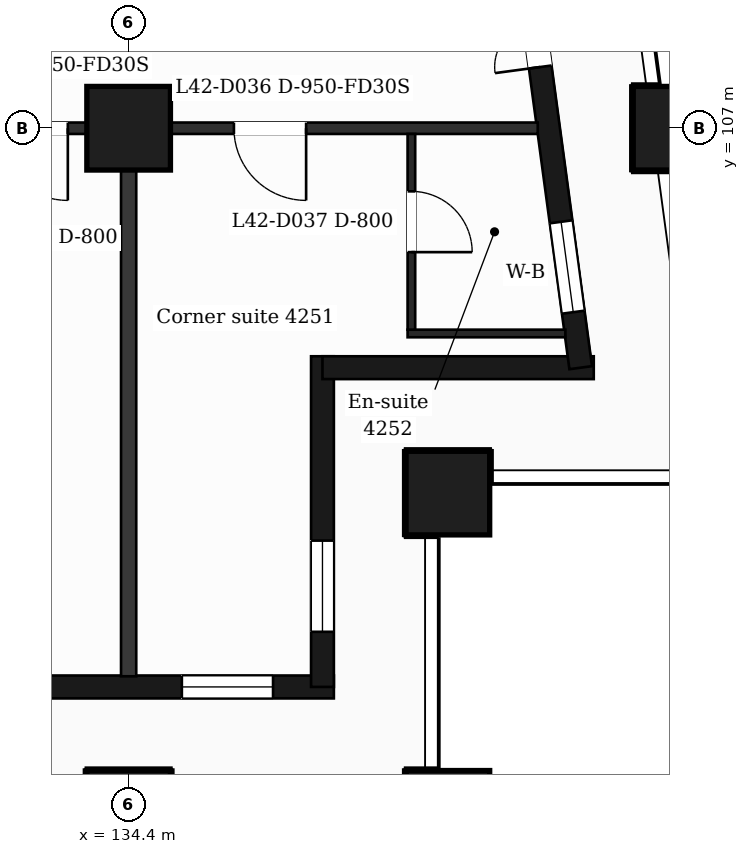
"""IFC4 building model, lengths in metres.
Left out: names, types, materials, properties, quantities, classifications, styles, units other than length and angle.
Written with IfcOpenShell. Run it as: python <this file> out.ifc"""

import sys

from ifc_helpers import new_model, si_unit, direction, frame, frame_2d, origin, origin_2d, place, context, subcontext, project, spatial, rectangle, extrude, element, fill, save


model = new_model("IFC4")
c1 = context("Model", 3, precision=1e-05, world=origin(), true_north=direction((0.0, 1.0)))
c2 = subcontext(c1, "Body", "Model", "MODEL_VIEW")
j1 = project(units=[si_unit("LENGTHUNIT", "METRE"), si_unit("PLANEANGLEUNIT", "RADIAN")], contexts=[c1])
p1 = place(None, origin())
s1 = spatial("IfcSite", under=j1, at=p1, CompositionType="ELEMENT")
p2 = place(p1, origin())
s2 = spatial("IfcBuilding", under=s1, at=p2, CompositionType="ELEMENT")
p3 = place(p2, frame((0.0, 0.0, 177.4)))
s3 = spatial("IfcBuildingStorey", under=s2, at=p3, CompositionType="ELEMENT", Elevation=177.4)
for number, where, z_axis, x_axis in (
    (1, (134.4, 98.0, 0.0), (0.0, 0.0, 1.0), (1.0, 0.0, 0.0)),
    (2, (138.6, 98.0, 0.0), (0.0, 0.0, 1.0), (1.0, 0.0, 0.0)),
    (3, (138.6, 102.2, 0.0), (0.0, 0.0, 1.0), (1.0, 0.0, 0.0)),
    (4, (134.4, 107.0, 0.0), (0.0, 0.0, 1.0), (1.0, 0.0, 0.0)),
    (5, (141.588, 107.0, 0.0), (0.0, 0.0, 1.0), (1.0, 0.0, 0.0)),
):
    element("IfcColumn", number, at=place(p3, frame(where, z_axis=z_axis, x_axis=x_axis)), inside=s3, PredefinedType="COLUMN", context=c2, shape_type="SweptSolid", body=[
        extrude(rectangle(XDim=1.1, YDim=1.1, at=origin_2d()), origin(), (0.0, 0.0, 1.0), 3.7),
    ])
p4 = place(p3, frame((89.85, 99.65, 0.0), z_axis=(0.0, 0.0, 1.0), x_axis=(1.0, 0.0, 0.0)))
e6 = element("IfcWall", 6, at=p4, inside=s3, PredefinedType="SOLIDWALL", context=c2, shape_type="SweptSolid", body=[
    extrude(rectangle(XDim=47.25, YDim=0.3, at=frame_2d((23.625, 0.0))), origin(), (0.0, 0.0, 1.0), 3.38),
])
p5 = place(p4, frame((0.725, 0.0, 0.9)))
e7 = element("IfcOpeningElement", 7, at=p5, cuts=e6, PredefinedType="OPENING", context=c2, shape_type="SweptSolid", body=[
    extrude(rectangle(XDim=1.2, YDim=2.1, at=frame_2d((0.6, 1.05))), frame((0.0, 0.16, 0.0), z_axis=(0.0, -1.0, 0.0), x_axis=(1.0, 0.0, 0.0)), (0.0, 0.0, 1.0), 0.32),
])
p6 = place(p4, frame((3.45, 0.0, 0.9)))
e8 = element("IfcOpeningElement", 8, at=p6, cuts=e6, PredefinedType="OPENING", context=c2, shape_type="SweptSolid", body=[
    extrude(rectangle(XDim=2.4, YDim=2.1, at=frame_2d((1.2, 1.05))), frame((0.0, 0.16, 0.0), z_axis=(0.0, -1.0, 0.0), x_axis=(1.0, 0.0, 0.0)), (0.0, 0.0, 1.0), 0.32),
])
p7 = place(p4, frame((8.25, 0.0, 0.9)))
e9 = element("IfcOpeningElement", 9, at=p7, cuts=e6, PredefinedType="OPENING", context=c2, shape_type="SweptSolid", body=[
    extrude(rectangle(XDim=1.2, YDim=2.1, at=frame_2d((0.6, 1.05))), frame((0.0, 0.16, 0.0), z_axis=(0.0, -1.0, 0.0), x_axis=(1.0, 0.0, 0.0)), (0.0, 0.0, 1.0), 0.32),
])
p8 = place(p4, frame((12.45, 0.0, 0.9)))
e10 = element("IfcOpeningElement", 10, at=p8, cuts=e6, PredefinedType="OPENING", context=c2, shape_type="SweptSolid", body=[
    extrude(rectangle(XDim=1.2, YDim=2.1, at=frame_2d((0.6, 1.05))), frame((0.0, 0.16, 0.0), z_axis=(0.0, -1.0, 0.0), x_axis=(1.0, 0.0, 0.0)), (0.0, 0.0, 1.0), 0.32),
])
p9 = place(p4, frame((16.05, 0.0, 0.9)))
e11 = element("IfcOpeningElement", 11, at=p9, cuts=e6, PredefinedType="OPENING", context=c2, shape_type="SweptSolid", body=[
    extrude(rectangle(XDim=2.4, YDim=2.1, at=frame_2d((1.2, 1.05))), frame((0.0, 0.16, 0.0), z_axis=(0.0, -1.0, 0.0), x_axis=(1.0, 0.0, 0.0)), (0.0, 0.0, 1.0), 0.32),
])
p10 = place(p4, frame((20.25, 0.0, 0.9)))
e12 = element("IfcOpeningElement", 12, at=p10, cuts=e6, PredefinedType="OPENING", context=c2, shape_type="SweptSolid", body=[
    extrude(rectangle(XDim=2.4, YDim=2.1, at=frame_2d((1.2, 1.05))), frame((0.0, 0.16, 0.0), z_axis=(0.0, -1.0, 0.0), x_axis=(1.0, 0.0, 0.0)), (0.0, 0.0, 1.0), 0.32),
])
p11 = place(p4, frame((25.05, 0.0, 0.0)))
e13 = element("IfcOpeningElement", 13, at=p11, cuts=e6, PredefinedType="OPENING", context=c2, shape_type="SweptSolid", body=[
    extrude(rectangle(XDim=1.2, YDim=2.4, at=frame_2d((0.6, 1.2))), frame((0.0, 0.16, 0.0), z_axis=(0.0, -1.0, 0.0), x_axis=(1.0, 0.0, 0.0)), (0.0, 0.0, 1.0), 0.32),
])
p12 = place(p4, frame((28.65, 0.0, 0.9)))
e14 = element("IfcOpeningElement", 14, at=p12, cuts=e6, PredefinedType="OPENING", context=c2, shape_type="SweptSolid", body=[
    extrude(rectangle(XDim=2.4, YDim=2.1, at=frame_2d((1.2, 1.05))), frame((0.0, 0.16, 0.0), z_axis=(0.0, -1.0, 0.0), x_axis=(1.0, 0.0, 0.0)), (0.0, 0.0, 1.0), 0.32),
])
p13 = place(p4, frame((32.85, 0.0, 0.9)))
e15 = element("IfcOpeningElement", 15, at=p13, cuts=e6, PredefinedType="OPENING", context=c2, shape_type="SweptSolid", body=[
    extrude(rectangle(XDim=2.4, YDim=2.1, at=frame_2d((1.2, 1.05))), frame((0.0, 0.16, 0.0), z_axis=(0.0, -1.0, 0.0), x_axis=(1.0, 0.0, 0.0)), (0.0, 0.0, 1.0), 0.32),
])
p14 = place(p4, frame((37.65, 0.0, 0.9)))
e16 = element("IfcOpeningElement", 16, at=p14, cuts=e6, PredefinedType="OPENING", context=c2, shape_type="SweptSolid", body=[
    extrude(rectangle(XDim=1.2, YDim=2.1, at=frame_2d((0.6, 1.05))), frame((0.0, 0.16, 0.0), z_axis=(0.0, -1.0, 0.0), x_axis=(1.0, 0.0, 0.0)), (0.0, 0.0, 1.0), 0.32),
])
p15 = place(p4, frame((41.85, 0.0, 0.9)))
e17 = element("IfcOpeningElement", 17, at=p15, cuts=e6, PredefinedType="OPENING", context=c2, shape_type="SweptSolid", body=[
    extrude(rectangle(XDim=1.2, YDim=2.1, at=frame_2d((0.6, 1.05))), frame((0.0, 0.16, 0.0), z_axis=(0.0, -1.0, 0.0), x_axis=(1.0, 0.0, 0.0)), (0.0, 0.0, 1.0), 0.32),
])
p16 = place(p4, frame((45.25, 0.0, 0.9)))
e18 = element("IfcOpeningElement", 18, at=p16, cuts=e6, PredefinedType="OPENING", context=c2, shape_type="SweptSolid", body=[
    extrude(rectangle(XDim=1.2, YDim=2.1, at=frame_2d((0.6, 1.05))), frame((0.0, 0.16, 0.0), z_axis=(0.0, -1.0, 0.0), x_axis=(1.0, 0.0, 0.0)), (0.0, 0.0, 1.0), 0.32),
])
p17 = place(p3, frame((136.95, 99.65, 0.0), z_axis=(0.0, 0.0, 1.0), x_axis=(0.0, 1.0, 0.0)))
e19 = element("IfcWall", 19, at=p17, inside=s3, PredefinedType="SOLIDWALL", context=c2, shape_type="SweptSolid", body=[
    extrude(rectangle(XDim=4.35, YDim=0.3, at=frame_2d((2.175, 0.0))), origin(), (0.0, 0.0, 1.0), 3.38),
])
p18 = place(p17, frame((0.725, 0.0, 0.9)))
e20 = element("IfcOpeningElement", 20, at=p18, cuts=e19, PredefinedType="OPENING", context=c2, shape_type="SweptSolid", body=[
    extrude(rectangle(XDim=1.2, YDim=2.1, at=frame_2d((0.6, 1.05))), frame((0.0, 0.16, 0.0), z_axis=(0.0, -1.0, 0.0), x_axis=(1.0, 0.0, 0.0)), (0.0, 0.0, 1.0), 0.32),
])
p19 = place(p3, frame((136.95, 103.85, 0.0), z_axis=(0.0, 0.0, 1.0), x_axis=(1.0, 0.0, 0.0)))
e21 = element("IfcWall", 21, at=p19, inside=s3, PredefinedType="SOLIDWALL", context=c2, shape_type="SweptSolid", body=[
    extrude(rectangle(XDim=3.569, YDim=0.3, at=frame_2d((1.785, 0.0))), origin(), (0.0, 0.0, 1.0), 3.38),
])
p20 = place(p3, frame((140.348, 103.85, 0.0), z_axis=(0.0, 0.0, 1.0), x_axis=(-0.133431549479, 0.991058031401, 0.0)))
e22 = element("IfcWall", 22, at=p20, inside=s3, PredefinedType="SOLIDWALL", context=c2, shape_type="SweptSolid", body=[
    extrude(rectangle(XDim=6.609, YDim=0.3, at=frame_2d((3.304, 0.0))), origin(), (0.0, 0.0, 1.0), 3.38),
])
p21 = place(p20, frame((0.737, 0.0, 0.9)))
e23 = element("IfcOpeningElement", 23, at=p21, cuts=e22, PredefinedType="OPENING", context=c2, shape_type="SweptSolid", body=[
    extrude(rectangle(XDim=1.2, YDim=2.1, at=frame_2d((0.6, 1.05))), frame((0.0, 0.16, 0.0), z_axis=(0.0, -1.0, 0.0), x_axis=(1.0, 0.0, 0.0)), (0.0, 0.0, 1.0), 0.32),
])
p22 = place(p20, frame((3.991, 0.0, 0.0)))
e24 = element("IfcOpeningElement", 24, at=p22, cuts=e22, PredefinedType="OPENING", context=c2, shape_type="SweptSolid", body=[
    extrude(rectangle(XDim=1.2, YDim=2.4, at=frame_2d((0.6, 1.2))), frame((0.0, 0.16, 0.0), z_axis=(0.0, -1.0, 0.0), x_axis=(1.0, 0.0, 0.0)), (0.0, 0.0, 1.0), 0.32),
])
p23 = place(p3, frame((138.07, 104.3, 0.0), z_axis=(0.0, 0.0, 1.0), x_axis=(1.0, 0.0, 0.0)))
e25 = element("IfcWall", 25, at=p23, inside=s3, PredefinedType="PARTITIONING", context=c2, shape_type="SweptSolid", body=[
    extrude(rectangle(XDim=2.076, YDim=0.1, at=frame_2d((1.038, 0.0))), origin(), (0.0, 0.0, 1.0), 3.38),
])
p24 = place(p3, frame((87.018, 107.0, 0.0), z_axis=(0.0, 0.0, 1.0), x_axis=(1.0, 0.0, 0.0)))
e26 = element("IfcWall", 26, at=p24, inside=s3, PredefinedType="PARTITIONING", context=c2, shape_type="SweptSolid", body=[
    extrude(rectangle(XDim=52.765, YDim=0.15, at=frame_2d((26.382, 0.0))), origin(), (0.0, 0.0, 1.0), 3.38),
])
p25 = place(p24, frame((1.276, 0.0, 0.0)))
e27 = element("IfcOpeningElement", 27, at=p25, cuts=e26, PredefinedType="OPENING", context=c2, shape_type="SweptSolid", body=[
    extrude(rectangle(XDim=0.95, YDim=2.1, at=frame_2d((0.475, 1.05))), frame((0.0, 0.085, 0.0), z_axis=(0.0, -1.0, 0.0), x_axis=(1.0, 0.0, 0.0)), (0.0, 0.0, 1.0), 0.17),
])
p26 = place(p24, frame((8.357, 0.0, 0.0)))
e28 = element("IfcOpeningElement", 28, at=p26, cuts=e26, PredefinedType="OPENING", context=c2, shape_type="SweptSolid", body=[
    extrude(rectangle(XDim=0.95, YDim=2.1, at=frame_2d((0.475, 1.05))), frame((0.0, 0.085, 0.0), z_axis=(0.0, -1.0, 0.0), x_axis=(1.0, 0.0, 0.0)), (0.0, 0.0, 1.0), 0.17),
])
p27 = place(p24, frame((9.832, 0.0, 0.0)))
e29 = element("IfcOpeningElement", 29, at=p27, cuts=e26, PredefinedType="OPENING", context=c2, shape_type="SweptSolid", body=[
    extrude(rectangle(XDim=1.0, YDim=2.1, at=frame_2d((0.5, 1.05))), frame((0.0, 0.085, 0.0), z_axis=(0.0, -1.0, 0.0), x_axis=(1.0, 0.0, 0.0)), (0.0, 0.0, 1.0), 0.17),
])
p28 = place(p24, frame((14.547, 0.0, 0.0)))
e30 = element("IfcOpeningElement", 30, at=p28, cuts=e26, PredefinedType="OPENING", context=c2, shape_type="SweptSolid", body=[
    extrude(rectangle(XDim=0.95, YDim=2.1, at=frame_2d((0.475, 1.05))), frame((0.0, 0.085, 0.0), z_axis=(0.0, -1.0, 0.0), x_axis=(1.0, 0.0, 0.0)), (0.0, 0.0, 1.0), 0.17),
])
p29 = place(p24, frame((18.257, 0.0, 0.0)))
e31 = element("IfcOpeningElement", 31, at=p29, cuts=e26, PredefinedType="OPENING", context=c2, shape_type="SweptSolid", body=[
    extrude(rectangle(XDim=0.95, YDim=2.1, at=frame_2d((0.475, 1.05))), frame((0.0, 0.085, 0.0), z_axis=(0.0, -1.0, 0.0), x_axis=(1.0, 0.0, 0.0)), (0.0, 0.0, 1.0), 0.17),
])
p30 = place(p24, frame((25.212, 0.0, 0.0)))
e32 = element("IfcOpeningElement", 32, at=p30, cuts=e26, PredefinedType="OPENING", context=c2, shape_type="SweptSolid", body=[
    extrude(rectangle(XDim=1.0, YDim=2.1, at=frame_2d((0.5, 1.05))), frame((0.0, 0.085, 0.0), z_axis=(0.0, -1.0, 0.0), x_axis=(1.0, 0.0, 0.0)), (0.0, 0.0, 1.0), 0.17),
])
p31 = place(p24, frame((37.267, 0.0, 0.0)))
e33 = element("IfcOpeningElement", 33, at=p31, cuts=e26, PredefinedType="OPENING", context=c2, shape_type="SweptSolid", body=[
    extrude(rectangle(XDim=0.95, YDim=2.1, at=frame_2d((0.475, 1.05))), frame((0.0, 0.085, 0.0), z_axis=(0.0, -1.0, 0.0), x_axis=(1.0, 0.0, 0.0)), (0.0, 0.0, 1.0), 0.17),
])
p32 = place(p24, frame((41.957, 0.0, 0.0)))
e34 = element("IfcOpeningElement", 34, at=p32, cuts=e26, PredefinedType="OPENING", context=c2, shape_type="SweptSolid", body=[
    extrude(rectangle(XDim=0.95, YDim=2.1, at=frame_2d((0.475, 1.05))), frame((0.0, 0.085, 0.0), z_axis=(0.0, -1.0, 0.0), x_axis=(1.0, 0.0, 0.0)), (0.0, 0.0, 1.0), 0.17),
])
p33 = place(p24, frame((45.632, 0.0, 0.0)))
e35 = element("IfcOpeningElement", 35, at=p33, cuts=e26, PredefinedType="OPENING", context=c2, shape_type="SweptSolid", body=[
    extrude(rectangle(XDim=0.95, YDim=2.1, at=frame_2d((0.475, 1.05))), frame((0.0, 0.085, 0.0), z_axis=(0.0, -1.0, 0.0), x_axis=(1.0, 0.0, 0.0)), (0.0, 0.0, 1.0), 0.17),
])
p34 = place(p24, frame((48.767, 0.0, 0.0)))
e36 = element("IfcOpeningElement", 36, at=p34, cuts=e26, PredefinedType="OPENING", context=c2, shape_type="SweptSolid", body=[
    extrude(rectangle(XDim=0.95, YDim=2.1, at=frame_2d((0.475, 1.05))), frame((0.0, 0.085, 0.0), z_axis=(0.0, -1.0, 0.0), x_axis=(1.0, 0.0, 0.0)), (0.0, 0.0, 1.0), 0.17),
])
p35 = place(p3, frame((134.4, 99.79, 0.0), z_axis=(0.0, 0.0, 1.0), x_axis=(0.0, 1.0, 0.0)))
e37 = element("IfcWall", 37, at=p35, inside=s3, PredefinedType="PARTITIONING", context=c2, shape_type="SweptSolid", body=[
    extrude(rectangle(XDim=7.135, YDim=0.2, at=frame_2d((3.567, 0.0))), origin(), (0.0, 0.0, 1.0), 3.38),
])
p36 = place(p3, frame((138.12, 104.35, 0.0), z_axis=(0.0, 0.0, 1.0), x_axis=(0.0, 1.0, 0.0)))
e38 = element("IfcWall", 38, at=p36, inside=s3, PredefinedType="PARTITIONING", context=c2, shape_type="SweptSolid", body=[
    extrude(rectangle(XDim=2.575, YDim=0.1, at=frame_2d((1.288, 0.0))), origin(), (0.0, 0.0, 1.0), 3.38),
])
p37 = place(p36, frame((1.02, 0.0, 0.0)))
e39 = element("IfcOpeningElement", 39, at=p37, cuts=e38, PredefinedType="OPENING", context=c2, shape_type="SweptSolid", body=[
    extrude(rectangle(XDim=0.8, YDim=2.1, at=frame_2d((0.4, 1.05))), frame((0.0, 0.06, 0.0), z_axis=(0.0, -1.0, 0.0), x_axis=(1.0, 0.0, 0.0)), (0.0, 0.0, 1.0), 0.12),
])
p38 = place(p16, origin())
e40 = element("IfcWindow", 40, at=p38, inside=s3, PartitioningType="SINGLE_PANEL", PredefinedType="WINDOW", context=c2, shape_type="SweptSolid", body=[
    extrude(rectangle(XDim=1.2, YDim=2.1, at=frame_2d((0.6, 1.05))), frame((0.0, 0.03, 0.0), z_axis=(0.0, -1.0, 0.0), x_axis=(1.0, 0.0, 0.0)), (0.0, 0.0, 1.0), 0.06),
])
fill(e18, e40)
p39 = place(p18, origin())
e41 = element("IfcWindow", 41, at=p39, inside=s3, PartitioningType="SINGLE_PANEL", PredefinedType="WINDOW", context=c2, shape_type="SweptSolid", body=[
    extrude(rectangle(XDim=1.2, YDim=2.1, at=frame_2d((0.6, 1.05))), frame((0.0, 0.03, 0.0), z_axis=(0.0, -1.0, 0.0), x_axis=(1.0, 0.0, 0.0)), (0.0, 0.0, 1.0), 0.06),
])
fill(e20, e41)
p40 = place(p21, origin())
e42 = element("IfcWindow", 42, at=p40, inside=s3, PartitioningType="SINGLE_PANEL", PredefinedType="WINDOW", context=c2, shape_type="SweptSolid", body=[
    extrude(rectangle(XDim=1.2, YDim=2.1, at=frame_2d((0.6, 1.05))), frame((0.0, 0.03, 0.0), z_axis=(0.0, -1.0, 0.0), x_axis=(1.0, 0.0, 0.0)), (0.0, 0.0, 1.0), 0.06),
])
fill(e23, e42)
p41 = place(p22, origin())
e43 = element("IfcDoor", 43, at=p41, inside=s3, OperationType="DOUBLE_DOOR_SINGLE_SWING", PredefinedType="DOOR", context=c2, shape_type="SweptSolid", body=[
    extrude(rectangle(XDim=1.2, YDim=2.4, at=frame_2d((0.6, 1.2))), frame((0.0, 0.025, 0.0), z_axis=(0.0, -1.0, 0.0), x_axis=(1.0, 0.0, 0.0)), (0.0, 0.0, 1.0), 0.05),
])
fill(e24, e43)
p42 = place(p33, origin())
e44 = element("IfcDoor", 44, at=p42, inside=s3, OperationType="SINGLE_SWING_RIGHT", PredefinedType="DOOR", context=c2, shape_type="SweptSolid", body=[
    extrude(rectangle(XDim=0.95, YDim=2.1, at=frame_2d((0.475, 1.05))), frame((0.0, 0.025, 0.0), z_axis=(0.0, -1.0, 0.0), x_axis=(1.0, 0.0, 0.0)), (0.0, 0.0, 1.0), 0.05),
])
fill(e35, e44)
p43 = place(p34, origin())
e45 = element("IfcDoor", 45, at=p43, inside=s3, OperationType="SINGLE_SWING_RIGHT", PredefinedType="DOOR", context=c2, shape_type="SweptSolid", body=[
    extrude(rectangle(XDim=0.95, YDim=2.1, at=frame_2d((0.475, 1.05))), frame((0.0, 0.025, 0.0), z_axis=(0.0, -1.0, 0.0), x_axis=(1.0, 0.0, 0.0)), (0.0, 0.0, 1.0), 0.05),
])
fill(e36, e45)
p44 = place(p37, origin())
e46 = element("IfcDoor", 46, at=p44, inside=s3, OperationType="SINGLE_SWING_LEFT", PredefinedType="DOOR", context=c2, shape_type="SweptSolid", body=[
    extrude(rectangle(XDim=0.8, YDim=2.1, at=frame_2d((0.4, 1.05))), frame((0.0, 0.025, 0.0), z_axis=(0.0, -1.0, 0.0), x_axis=(1.0, 0.0, 0.0)), (0.0, 0.0, 1.0), 0.05),
])
fill(e39, e46)
save(model, sys.argv[1])
